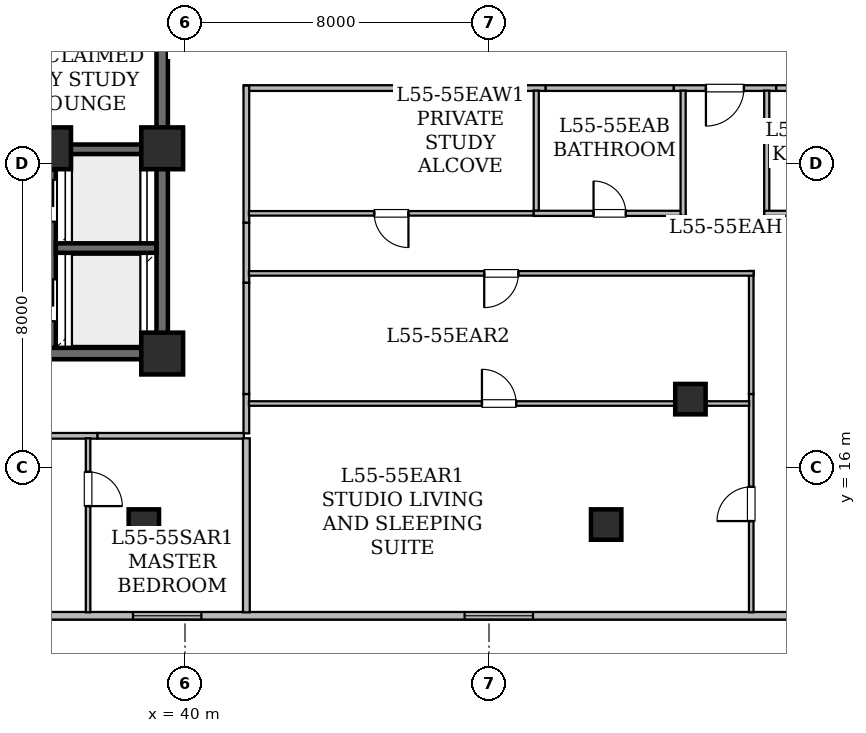
"""IFC4 building model, lengths in metres.
Left out: names, types, materials, properties, quantities, classifications, styles, units other than length and angle.
Written with IfcOpenShell. Run it as: python <this file> out.ifc"""

import sys

from ifc_helpers import new_model, si_unit, direction, frame, frame_2d, origin, origin_2d, place, context, subcontext, project, spatial, rectangle, hollow_rectangle, extrude, element, fill, save


model = new_model("IFC4")
c1 = context("Model", 3, precision=1e-05, world=origin(), true_north=direction((0.0, 1.0)))
c2 = subcontext(c1, "Body", "Model", "MODEL_VIEW")
j1 = project(units=[si_unit("LENGTHUNIT", "METRE"), si_unit("PLANEANGLEUNIT", "RADIAN")], contexts=[c1])
p1 = place(None, origin())
s1 = spatial("IfcSite", under=j1, at=p1, CompositionType="ELEMENT")
p2 = place(p1, origin())
s2 = spatial("IfcBuilding", under=s1, at=p2, CompositionType="ELEMENT")
p3 = place(p2, frame((0.0, 0.0, 217.2)))
s3 = spatial("IfcBuildingStorey", under=s2, at=p3, CompositionType="ELEMENT", Elevation=217.2)
for number, where, z_axis, x_axis in (
    (1, (39.4, 19.0, 0.0), (0.0, 0.0, 1.0), (1.0, 0.0, 0.0)),
    (2, (36.45, 24.4, 0.0), (0.0, 0.0, 1.0), (1.0, 0.0, 0.0)),
    (3, (39.4, 24.4, 0.0), (0.0, 0.0, 1.0), (1.0, 0.0, 0.0)),
):
    element("IfcColumn", number, at=place(p3, frame(where, z_axis=z_axis, x_axis=x_axis)), inside=s3, PredefinedType="COLUMN", context=c2, shape_type="SweptSolid", body=[
        extrude(hollow_rectangle(XDim=1.1, YDim=1.1, WallThickness=0.055, at=origin_2d()), origin(), (0.0, 0.0, 1.0), 3.65),
    ])
for number, where, z_axis, x_axis in (
    (4, (38.917, 14.5, 0.025), (0.0, 0.0, 1.0), (1.0, 0.0, 0.0)),
    (5, (51.083, 14.5, 0.025), (0.0, 0.0, 1.0), (1.0, 0.0, 0.0)),
    (6, (53.3, 17.8, 0.025), (0.0, 0.0, 1.0), (1.0, 0.0, 0.0)),
):
    element("IfcColumn", number, at=place(p3, frame(where, z_axis=z_axis, x_axis=x_axis)), inside=s3, PredefinedType="COLUMN", context=c2, shape_type="SweptSolid", body=[
        extrude(hollow_rectangle(XDim=0.8, YDim=0.8, WallThickness=0.04, at=origin_2d()), origin(), (0.0, 0.0, 1.0), 3.625),
    ])
p4 = place(p3, frame((65.696, 12.1, 0.0), z_axis=(0.0, 0.0, 1.0), x_axis=(-1.0, 0.0, 0.0)))
e7 = element("IfcWall", 7, at=p4, inside=s3, PredefinedType="STANDARD", context=c2, shape_type="SweptSolid", body=[
    extrude(rectangle(XDim=41.393, YDim=0.2, at=frame_2d((20.697, 0.0))), origin(), (0.0, 0.0, 1.0), 3.43),
])
p5 = place(p4, frame((39.085, 0.0, 0.85)))
e8 = element("IfcOpeningElement", 8, at=p5, cuts=e7, PredefinedType="OPENING", context=c2, shape_type="SweptSolid", body=[
    extrude(rectangle(XDim=1.8, YDim=0.92, at=frame_2d((0.9, 0.46))), frame((0.0, 0.11, 0.0), z_axis=(0.0, -1.0, 0.0), x_axis=(1.0, 0.0, 0.0)), (0.0, 0.0, 1.0), 0.22),
])
p6 = place(p4, frame((30.571, 0.0, 0.85)))
e9 = element("IfcOpeningElement", 9, at=p6, cuts=e7, PredefinedType="OPENING", context=c2, shape_type="SweptSolid", body=[
    extrude(rectangle(XDim=1.8, YDim=0.92, at=frame_2d((0.9, 0.46))), frame((0.0, 0.11, 0.0), z_axis=(0.0, -1.0, 0.0), x_axis=(1.0, 0.0, 0.0)), (0.0, 0.0, 1.0), 0.22),
])
p7 = place(p4, frame((25.264, 0.0, 0.85)))
e10 = element("IfcOpeningElement", 10, at=p7, cuts=e7, PredefinedType="OPENING", context=c2, shape_type="SweptSolid", body=[
    extrude(rectangle(XDim=1.8, YDim=0.92, at=frame_2d((0.9, 0.46))), frame((0.0, 0.11, 0.0), z_axis=(0.0, -1.0, 0.0), x_axis=(1.0, 0.0, 0.0)), (0.0, 0.0, 1.0), 0.22),
])
p8 = place(p4, frame((16.538, 0.0, 0.85)))
e11 = element("IfcOpeningElement", 11, at=p8, cuts=e7, PredefinedType="OPENING", context=c2, shape_type="SweptSolid", body=[
    extrude(rectangle(XDim=1.8, YDim=0.92, at=frame_2d((0.9, 0.46))), frame((0.0, 0.11, 0.0), z_axis=(0.0, -1.0, 0.0), x_axis=(1.0, 0.0, 0.0)), (0.0, 0.0, 1.0), 0.22),
])
p9 = place(p4, frame((4.105, 0.0, 0.85)))
e12 = element("IfcOpeningElement", 12, at=p9, cuts=e7, PredefinedType="OPENING", context=c2, shape_type="SweptSolid", body=[
    extrude(rectangle(XDim=1.8, YDim=0.92, at=frame_2d((0.9, 0.46))), frame((0.0, 0.11, 0.0), z_axis=(0.0, -1.0, 0.0), x_axis=(1.0, 0.0, 0.0)), (0.0, 0.0, 1.0), 0.22),
])
p10 = place(p3, frame((29.0, 19.0, 0.0), z_axis=(0.0, 0.0, 1.0), x_axis=(1.0, 0.0, 0.0)))
e13 = element("IfcWall", 13, at=p10, inside=s3, PredefinedType="SHEAR", context=c2, shape_type="SweptSolid", body=[
    extrude(rectangle(XDim=10.4, YDim=0.3, at=frame_2d((5.2, 0.0))), origin(), (0.0, 0.0, 1.0), 3.43),
])
p11 = place(p10, frame((4.9, 0.0, 0.0)))
e14 = element("IfcOpeningElement", 14, at=p11, cuts=e13, PredefinedType="OPENING", context=c2, shape_type="SweptSolid", body=[
    extrude(rectangle(XDim=1.2, YDim=2.15, at=frame_2d((0.6, 1.075))), frame((0.0, 0.16, 0.0), z_axis=(0.0, -1.0, 0.0), x_axis=(1.0, 0.0, 0.0)), (0.0, 0.0, 1.0), 0.32),
])
p12 = place(p3, frame((39.4, 19.0, 0.0), z_axis=(0.0, 0.0, 1.0), x_axis=(0.0, 1.0, 0.0)))
e15 = element("IfcWall", 15, at=p12, inside=s3, PredefinedType="SHEAR", context=c2, shape_type="SweptSolid", body=[
    extrude(rectangle(XDim=5.4, YDim=0.3, at=frame_2d((2.7, 0.0))), origin(), (0.0, 0.0, 1.0), 3.43),
])
p13 = place(p3, frame((39.4, 24.4, 0.0), z_axis=(0.0, 0.0, 1.0), x_axis=(0.0, 1.0, 0.0)))
e16 = element("IfcWall", 16, at=p13, inside=s3, PredefinedType="SHEAR", context=c2, shape_type="SweptSolid", body=[
    extrude(rectangle(XDim=12.6, YDim=0.3, at=frame_2d((6.3, 0.0))), origin(), (0.0, 0.0, 1.0), 3.43),
])
p14 = place(p3, frame((36.45, 19.154, 0.0), z_axis=(0.0, 0.0, 1.0), x_axis=(0.0, 1.0, 0.0)))
e17 = element("IfcWall", 17, at=p14, inside=s3, PredefinedType="SHEAR", context=c2, shape_type="SweptSolid", body=[
    extrude(rectangle(XDim=4.696, YDim=0.3, at=frame_2d((2.348, 0.0))), origin(), (0.0, 0.0, 1.0), 3.43),
])
p15 = place(p14, frame((0.696, 0.0, 0.0)))
e18 = element("IfcOpeningElement", 18, at=p15, cuts=e17, PredefinedType="OPENING", context=c2, shape_type="SweptSolid", body=[
    extrude(rectangle(XDim=1.1, YDim=2.15, at=frame_2d((0.55, 1.075))), frame((0.0, 0.16, 0.0), z_axis=(0.0, -1.0, 0.0), x_axis=(1.0, 0.0, 0.0)), (0.0, 0.0, 1.0), 0.32),
])
p16 = place(p14, frame((3.316, 0.0, 0.0)))
e19 = element("IfcOpeningElement", 19, at=p16, cuts=e17, PredefinedType="OPENING", context=c2, shape_type="SweptSolid", body=[
    extrude(rectangle(XDim=1.1, YDim=2.15, at=frame_2d((0.55, 1.075))), frame((0.0, 0.16, 0.0), z_axis=(0.0, -1.0, 0.0), x_axis=(1.0, 0.0, 0.0)), (0.0, 0.0, 1.0), 0.32),
])
for number, where, z_axis, x_axis in (
    (20, (36.604, 21.775, 0.0), (0.0, 0.0, 1.0), (1.0, 0.0, 0.0)),
    (21, (36.604, 24.375, 0.0), (0.0, 0.0, 1.0), (1.0, 0.0, 0.0)),
):
    element("IfcWall", number, at=place(p3, frame(where, z_axis=z_axis, x_axis=x_axis)), inside=s3, PredefinedType="SHEAR", context=c2, shape_type="SweptSolid", body=[
        extrude(rectangle(XDim=2.642, YDim=0.25, at=frame_2d((1.321, 0.0))), origin(), (0.0, 0.0, 1.0), 3.43),
    ])
p17 = place(p3, frame((37.699, 16.835, 0.0), z_axis=(0.0, 0.0, 1.0), x_axis=(-1.0, 0.0, 0.0)))
e22 = element("IfcWall", 22, at=p17, inside=s3, PredefinedType="STANDARD", context=c2, shape_type="SweptSolid", body=[
    extrude(rectangle(XDim=6.948, YDim=0.15, at=frame_2d((3.474, 0.0))), origin(), (0.0, 0.0, 1.0), 3.43),
])
p18 = place(p17, frame((2.974, 0.0, 0.0)))
e23 = element("IfcOpeningElement", 23, at=p18, cuts=e22, PredefinedType="OPENING", context=c2, shape_type="SweptSolid", body=[
    extrude(rectangle(XDim=1.0, YDim=2.15, at=frame_2d((0.5, 1.075))), frame((0.0, 0.085, 0.0), z_axis=(0.0, -1.0, 0.0), x_axis=(1.0, 0.0, 0.0)), (0.0, 0.0, 1.0), 0.17),
])
p19 = place(p3, frame((41.55, 16.835, 0.0), z_axis=(0.0, 0.0, 1.0), x_axis=(-1.0, 0.0, 0.0)))
e24 = element("IfcWall", 24, at=p19, inside=s3, PredefinedType="STANDARD", context=c2, shape_type="SweptSolid", body=[
    extrude(rectangle(XDim=3.851, YDim=0.15, at=frame_2d((1.926, 0.0))), origin(), (0.0, 0.0, 1.0), 2.725),
])
p20 = place(p3, frame((49.492, 25.985, 0.0), z_axis=(0.0, 0.0, 1.0), x_axis=(-1.0, 0.0, 0.0)))
e25 = element("IfcWall", 25, at=p20, inside=s3, PredefinedType="STANDARD", context=c2, shape_type="SweptSolid", body=[
    extrude(rectangle(XDim=7.942, YDim=0.15, at=frame_2d((3.971, 0.0))), origin(), (0.0, 0.0, 1.0), 3.43),
])
p21 = place(p3, frame((41.615, 26.05, 0.0), z_axis=(0.0, 0.0, 1.0), x_axis=(0.0, -1.0, 0.0)))
e26 = element("IfcWall", 26, at=p21, inside=s3, PredefinedType="STANDARD", context=c2, shape_type="SweptSolid", body=[
    extrude(rectangle(XDim=3.61, YDim=0.15, at=frame_2d((1.805, 0.0))), origin(), (0.0, 0.0, 1.0), 3.43),
])
p22 = place(p3, frame((55.557, 25.985, 0.0), z_axis=(0.0, 0.0, 1.0), x_axis=(-1.0, 0.0, 0.0)))
e27 = element("IfcWall", 27, at=p22, inside=s3, PredefinedType="STANDARD", context=c2, shape_type="SweptSolid", body=[
    extrude(rectangle(XDim=2.698, YDim=0.15, at=frame_2d((1.349, 0.0))), origin(), (0.0, 0.0, 1.0), 2.725),
])
p23 = place(p22, frame((0.849, 0.0, 0.0)))
e28 = element("IfcOpeningElement", 28, at=p23, cuts=e27, PredefinedType="OPENING", context=c2, shape_type="SweptSolid", body=[
    extrude(rectangle(XDim=1.0, YDim=2.15, at=frame_2d((0.5, 1.075))), frame((0.0, 0.085, 0.0), z_axis=(0.0, -1.0, 0.0), x_axis=(1.0, 0.0, 0.0)), (0.0, 0.0, 1.0), 0.17),
])
p24 = place(p3, frame((41.615, 22.44, 0.0), z_axis=(0.0, 0.0, 1.0), x_axis=(0.0, -1.0, 0.0)))
e29 = element("IfcWall", 29, at=p24, inside=s3, PredefinedType="STANDARD", context=c2, shape_type="SweptSolid", body=[
    extrude(rectangle(XDim=1.58, YDim=0.15, at=frame_2d((0.79, 0.0))), origin(), (0.0, 0.0, 1.0), 3.43),
])
p25 = place(p3, frame((52.859, 25.985, 0.0), z_axis=(0.0, 0.0, 1.0), x_axis=(-1.0, 0.0, 0.0)))
e30 = element("IfcWall", 30, at=p25, inside=s3, PredefinedType="STANDARD", context=c2, shape_type="SweptSolid", body=[
    extrude(rectangle(XDim=3.367, YDim=0.15, at=frame_2d((1.684, 0.0))), origin(), (0.0, 0.0, 1.0), 3.43),
])
p26 = place(p3, frame((59.924, 25.985, 0.0), z_axis=(0.0, 0.0, 1.0), x_axis=(-1.0, 0.0, 0.0)))
e31 = element("IfcWall", 31, at=p26, inside=s3, PredefinedType="STANDARD", context=c2, shape_type="SweptSolid", body=[
    extrude(rectangle(XDim=4.367, YDim=0.15, at=frame_2d((2.184, 0.0))), origin(), (0.0, 0.0, 1.0), 3.43),
])
p27 = place(p3, frame((41.615, 17.935, 0.0), z_axis=(0.0, 0.0, 1.0), x_axis=(0.0, -1.0, 0.0)))
e32 = element("IfcWall", 32, at=p27, inside=s3, PredefinedType="STANDARD", context=c2, shape_type="SweptSolid", body=[
    extrude(rectangle(XDim=1.035, YDim=0.15, at=frame_2d((0.518, 0.0))), origin(), (0.0, 0.0, 1.0), 2.725),
])
p28 = place(p3, frame((41.615, 20.86, 0.0), z_axis=(0.0, 0.0, 1.0), x_axis=(0.0, -1.0, 0.0)))
e33 = element("IfcWall", 33, at=p28, inside=s3, PredefinedType="STANDARD", context=c2, shape_type="SweptSolid", body=[
    extrude(rectangle(XDim=2.925, YDim=0.15, at=frame_2d((1.462, 0.0))), origin(), (0.0, 0.0, 1.0), 2.725),
])
p29 = place(p3, frame((37.45, 16.77, 0.0), z_axis=(0.0, 0.0, 1.0), x_axis=(0.0, -1.0, 0.0)))
e34 = element("IfcWall", 34, at=p29, inside=s3, PredefinedType="PARTITIONING", context=c2, shape_type="SweptSolid", body=[
    extrude(rectangle(XDim=4.578, YDim=0.12, at=frame_2d((2.289, 0.0))), origin(), (0.0, 0.0, 1.0), 2.887),
])
p30 = place(p29, frame((0.884, 0.0, 0.0)))
e35 = element("IfcOpeningElement", 35, at=p30, cuts=e34, PredefinedType="OPENING", context=c2, shape_type="SweptSolid", body=[
    extrude(rectangle(XDim=0.9, YDim=2.1, at=frame_2d((0.45, 1.05))), frame((0.0, 0.07, 0.0), z_axis=(0.0, -1.0, 0.0), x_axis=(1.0, 0.0, 0.0)), (0.0, 0.0, 1.0), 0.14),
])
p31 = place(p3, frame((41.615, 16.77, 0.0), z_axis=(0.0, 0.0, 1.0), x_axis=(0.0, -1.0, 0.0)))
e36 = element("IfcWall", 36, at=p31, inside=s3, PredefinedType="STANDARD", context=c2, shape_type="SweptSolid", body=[
    extrude(rectangle(XDim=4.578, YDim=0.18, at=frame_2d((2.289, 0.0))), origin(), (0.0, 0.0, 1.0), 2.887),
])
p32 = place(p3, frame((49.178, 22.689, 0.0), z_axis=(0.0, 0.0, 1.0), x_axis=(-1.0, 0.0, 0.0)))
e37 = element("IfcWall", 37, at=p32, inside=s3, PredefinedType="PARTITIONING", context=c2, shape_type="SweptSolid", body=[
    extrude(rectangle(XDim=7.496, YDim=0.12, at=frame_2d((3.748, 0.0))), origin(), (0.0, 0.0, 1.0), 3.43),
])
p33 = place(p32, frame((3.298, 0.0, 0.0)))
e38 = element("IfcOpeningElement", 38, at=p33, cuts=e37, PredefinedType="OPENING", context=c2, shape_type="SweptSolid", body=[
    extrude(rectangle(XDim=0.9, YDim=2.1, at=frame_2d((0.45, 1.05))), frame((0.0, 0.07, 0.0), z_axis=(0.0, -1.0, 0.0), x_axis=(1.0, 0.0, 0.0)), (0.0, 0.0, 1.0), 0.14),
])
p34 = place(p3, frame((49.243, 25.918, 0.0), z_axis=(0.0, 0.0, 1.0), x_axis=(0.0, -1.0, 0.0)))
e39 = element("IfcWall", 39, at=p34, inside=s3, PredefinedType="PARTITIONING", context=c2, shape_type="SweptSolid", body=[
    extrude(rectangle(XDim=3.164, YDim=0.135, at=frame_2d((1.582, 0.0))), origin(), (0.0, 0.0, 1.0), 3.43),
])
p35 = place(p3, frame((49.178, 22.689, 0.0), z_axis=(0.0, 0.0, 1.0), x_axis=(1.0, 0.0, 0.0)))
e40 = element("IfcWall", 40, at=p35, inside=s3, PredefinedType="PARTITIONING", context=c2, shape_type="SweptSolid", body=[
    extrude(rectangle(XDim=3.995, YDim=0.135, at=frame_2d((1.998, 0.0))), origin(), (0.0, 0.0, 1.0), 2.725),
])
p36 = place(p35, frame((1.573, 0.0, 0.0)))
e41 = element("IfcOpeningElement", 41, at=p36, cuts=e40, PredefinedType="OPENING", context=c2, shape_type="SweptSolid", body=[
    extrude(rectangle(XDim=0.85, YDim=2.1, at=frame_2d((0.425, 1.05))), frame((0.0, 0.077, 0.0), z_axis=(0.0, -1.0, 0.0), x_axis=(1.0, 0.0, 0.0)), (0.0, 0.0, 1.0), 0.155),
])
p37 = place(p3, frame((53.108, 22.624, 0.0), z_axis=(0.0, 0.0, 1.0), x_axis=(0.0, 1.0, 0.0)))
e42 = element("IfcWall", 42, at=p37, inside=s3, PredefinedType="PARTITIONING", context=c2, shape_type="SweptSolid", body=[
    extrude(rectangle(XDim=3.294, YDim=0.135, at=frame_2d((1.647, 0.0))), origin(), (0.0, 0.0, 1.0), 2.725),
])
p38 = place(p3, frame((55.308, 25.918, 0.0), z_axis=(0.0, 0.0, 1.0), x_axis=(0.0, -1.0, 0.0)))
e43 = element("IfcWall", 43, at=p38, inside=s3, PredefinedType="PARTITIONING", context=c2, shape_type="SweptSolid", body=[
    extrude(rectangle(XDim=3.294, YDim=0.135, at=frame_2d((1.647, 0.0))), origin(), (0.0, 0.0, 1.0), 3.43),
])
p39 = place(p3, frame((55.243, 22.689, 0.0), z_axis=(0.0, 0.0, 1.0), x_axis=(1.0, 0.0, 0.0)))
e44 = element("IfcWall", 44, at=p39, inside=s3, PredefinedType="PARTITIONING", context=c2, shape_type="SweptSolid", body=[
    extrude(rectangle(XDim=4.995, YDim=0.135, at=frame_2d((2.498, 0.0))), origin(), (0.0, 0.0, 1.0), 3.43),
])
p40 = place(p39, frame((2.073, 0.0, 0.0)))
e45 = element("IfcOpeningElement", 45, at=p40, cuts=e44, PredefinedType="OPENING", context=c2, shape_type="SweptSolid", body=[
    extrude(rectangle(XDim=0.85, YDim=2.1, at=frame_2d((0.425, 1.05))), frame((0.0, 0.077, 0.0), z_axis=(0.0, -1.0, 0.0), x_axis=(1.0, 0.0, 0.0)), (0.0, 0.0, 1.0), 0.155),
])
p41 = place(p3, frame((54.9, 12.192, 0.0), z_axis=(0.0, 0.0, 1.0), x_axis=(0.0, 1.0, 0.0)))
e46 = element("IfcWall", 46, at=p41, inside=s3, PredefinedType="PARTITIONING", context=c2, shape_type="SweptSolid", body=[
    extrude(rectangle(XDim=5.743, YDim=0.12, at=frame_2d((2.872, 0.0))), origin(), (0.0, 0.0, 1.0), 2.725),
])
p42 = place(p41, frame((2.4, 0.0, 0.0)))
e47 = element("IfcOpeningElement", 47, at=p42, cuts=e46, PredefinedType="OPENING", context=c2, shape_type="SweptSolid", body=[
    extrude(rectangle(XDim=0.9, YDim=2.1, at=frame_2d((0.45, 1.05))), frame((0.0, 0.07, 0.0), z_axis=(0.0, -1.0, 0.0), x_axis=(1.0, 0.0, 0.0)), (0.0, 0.0, 1.0), 0.14),
])
p43 = place(p3, frame((54.9, 17.935, 0.0), z_axis=(0.0, 0.0, 1.0), x_axis=(0.0, 1.0, 0.0)))
e48 = element("IfcWall", 48, at=p43, inside=s3, PredefinedType="PARTITIONING", context=c2, shape_type="SweptSolid", body=[
    extrude(rectangle(XDim=3.239, YDim=0.12, at=frame_2d((1.62, 0.0))), origin(), (0.0, 0.0, 1.0), 2.725),
])
p44 = place(p3, frame((54.965, 21.109, 0.0), z_axis=(0.0, 0.0, 1.0), x_axis=(-1.0, 0.0, 0.0)))
e49 = element("IfcWall", 49, at=p44, inside=s3, PredefinedType="PARTITIONING", context=c2, shape_type="SweptSolid", body=[
    extrude(rectangle(XDim=13.283, YDim=0.12, at=frame_2d((6.642, 0.0))), origin(), (0.0, 0.0, 1.0), 2.725),
])
p45 = place(p44, frame((6.191, 0.0, 0.0)))
e50 = element("IfcOpeningElement", 50, at=p45, cuts=e49, PredefinedType="OPENING", context=c2, shape_type="SweptSolid", body=[
    extrude(rectangle(XDim=0.9, YDim=2.1, at=frame_2d((0.45, 1.05))), frame((0.0, 0.07, 0.0), z_axis=(0.0, -1.0, 0.0), x_axis=(1.0, 0.0, 0.0)), (0.0, 0.0, 1.0), 0.14),
])
p46 = place(p3, frame((41.682, 17.685, 0.0), z_axis=(0.0, 0.0, 1.0), x_axis=(1.0, 0.0, 0.0)))
e51 = element("IfcWall", 51, at=p46, inside=s3, PredefinedType="PARTITIONING", context=c2, shape_type="SweptSolid", body=[
    extrude(rectangle(XDim=13.164, YDim=0.12, at=frame_2d((6.582, 0.0))), origin(), (0.0, 0.0, 1.0), 2.725),
])
p47 = place(p46, frame((6.132, 0.0, 0.0)))
e52 = element("IfcOpeningElement", 52, at=p47, cuts=e51, PredefinedType="OPENING", context=c2, shape_type="SweptSolid", body=[
    extrude(rectangle(XDim=0.9, YDim=2.1, at=frame_2d((0.45, 1.05))), frame((0.0, 0.07, 0.0), z_axis=(0.0, -1.0, 0.0), x_axis=(1.0, 0.0, 0.0)), (0.0, 0.0, 1.0), 0.14),
])
p48 = place(p7, origin())
e53 = element("IfcWindow", 53, at=p48, inside=s3, PartitioningType="SINGLE_PANEL", PredefinedType="WINDOW", context=c2, shape_type="SweptSolid", body=[
    extrude(rectangle(XDim=1.8, YDim=0.92, at=frame_2d((0.9, 0.46))), frame((0.0, 0.03, 0.0), z_axis=(0.0, -1.0, 0.0), x_axis=(1.0, 0.0, 0.0)), (0.0, 0.0, 1.0), 0.06),
])
fill(e10, e53)
p49 = place(p8, origin())
e54 = element("IfcWindow", 54, at=p49, inside=s3, PartitioningType="SINGLE_PANEL", PredefinedType="WINDOW", context=c2, shape_type="SweptSolid", body=[
    extrude(rectangle(XDim=1.8, YDim=0.92, at=frame_2d((0.9, 0.46))), frame((0.0, 0.03, 0.0), z_axis=(0.0, -1.0, 0.0), x_axis=(1.0, 0.0, 0.0)), (0.0, 0.0, 1.0), 0.06),
])
fill(e11, e54)
p50 = place(p23, origin())
e55 = element("IfcDoor", 55, at=p50, inside=s3, OperationType="SINGLE_SWING_RIGHT", PredefinedType="DOOR", context=c2, shape_type="SweptSolid", body=[
    extrude(rectangle(XDim=1.0, YDim=2.15, at=frame_2d((0.5, 1.075))), frame((0.0, 0.025, 0.0), z_axis=(0.0, -1.0, 0.0), x_axis=(1.0, 0.0, 0.0)), (0.0, 0.0, 1.0), 0.05),
])
fill(e28, e55)
p51 = place(p30, origin())
e56 = element("IfcDoor", 56, at=p51, inside=s3, OperationType="SINGLE_SWING_RIGHT", PredefinedType="DOOR", context=c2, shape_type="SweptSolid", body=[
    extrude(rectangle(XDim=0.9, YDim=2.1, at=frame_2d((0.45, 1.05))), frame((0.0, 0.025, 0.0), z_axis=(0.0, -1.0, 0.0), x_axis=(1.0, 0.0, 0.0)), (0.0, 0.0, 1.0), 0.05),
])
fill(e35, e56)
p52 = place(p33, origin())
e57 = element("IfcDoor", 57, at=p52, inside=s3, OperationType="SINGLE_SWING_LEFT", PredefinedType="DOOR", context=c2, shape_type="SweptSolid", body=[
    extrude(rectangle(XDim=0.9, YDim=2.1, at=frame_2d((0.45, 1.05))), frame((0.0, 0.025, 0.0), z_axis=(0.0, -1.0, 0.0), x_axis=(1.0, 0.0, 0.0)), (0.0, 0.0, 1.0), 0.05),
])
fill(e38, e57)
p53 = place(p36, origin())
e58 = element("IfcDoor", 58, at=p53, inside=s3, OperationType="SINGLE_SWING_LEFT", PredefinedType="DOOR", context=c2, shape_type="SweptSolid", body=[
    extrude(rectangle(XDim=0.85, YDim=2.1, at=frame_2d((0.425, 1.05))), frame((0.0, 0.025, 0.0), z_axis=(0.0, -1.0, 0.0), x_axis=(1.0, 0.0, 0.0)), (0.0, 0.0, 1.0), 0.05),
])
fill(e41, e58)
p54 = place(p42, origin())
e59 = element("IfcDoor", 59, at=p54, inside=s3, OperationType="SINGLE_SWING_LEFT", PredefinedType="DOOR", context=c2, shape_type="SweptSolid", body=[
    extrude(rectangle(XDim=0.9, YDim=2.1, at=frame_2d((0.45, 1.05))), frame((0.0, 0.025, 0.0), z_axis=(0.0, -1.0, 0.0), x_axis=(1.0, 0.0, 0.0)), (0.0, 0.0, 1.0), 0.05),
])
fill(e47, e59)
p55 = place(p45, origin())
e60 = element("IfcDoor", 60, at=p55, inside=s3, OperationType="SINGLE_SWING_RIGHT", PredefinedType="DOOR", context=c2, shape_type="SweptSolid", body=[
    extrude(rectangle(XDim=0.9, YDim=2.1, at=frame_2d((0.45, 1.05))), frame((0.0, 0.025, 0.0), z_axis=(0.0, -1.0, 0.0), x_axis=(1.0, 0.0, 0.0)), (0.0, 0.0, 1.0), 0.05),
])
fill(e50, e60)
p56 = place(p47, origin())
e61 = element("IfcDoor", 61, at=p56, inside=s3, OperationType="SINGLE_SWING_LEFT", PredefinedType="DOOR", context=c2, shape_type="SweptSolid", body=[
    extrude(rectangle(XDim=0.9, YDim=2.1, at=frame_2d((0.45, 1.05))), frame((0.0, 0.025, 0.0), z_axis=(0.0, -1.0, 0.0), x_axis=(1.0, 0.0, 0.0)), (0.0, 0.0, 1.0), 0.05),
])
fill(e52, e61)
save(model, sys.argv[1])
